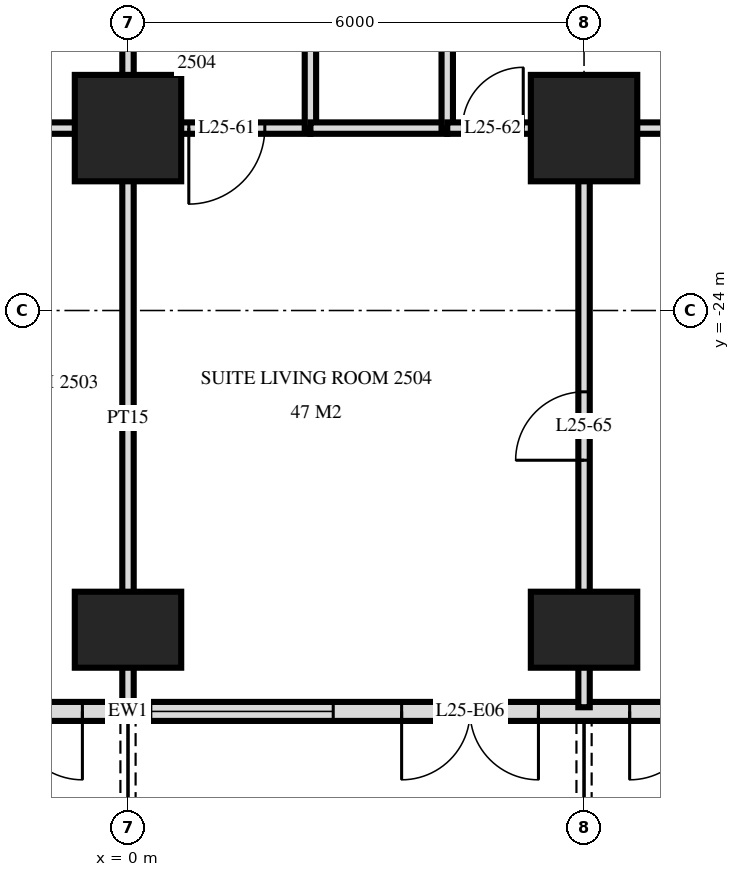
"""IFC4 building model, lengths in metres.
Left out: names, types, materials, properties, quantities, classifications, styles, units other than length and angle.
Written with IfcOpenShell. Run it as: python <this file> out.ifc"""

import sys

from ifc_helpers import new_model, si_unit, direction, frame, frame_2d, origin, origin_2d, place, context, subcontext, project, spatial, rectangle, extrude, element, fill, save


model = new_model("IFC4")
c1 = context("Model", 3, precision=1e-05, world=origin(), true_north=direction((0.0, 1.0)))
c2 = subcontext(c1, "Body", "Model", "MODEL_VIEW")
j1 = project(units=[si_unit("LENGTHUNIT", "METRE"), si_unit("PLANEANGLEUNIT", "RADIAN")], contexts=[c1])
p1 = place(None, origin())
s1 = spatial("IfcSite", under=j1, at=p1, CompositionType="ELEMENT")
p2 = place(p1, origin())
s2 = spatial("IfcBuilding", under=s1, at=p2, CompositionType="ELEMENT")
p3 = place(p2, frame((0.0, 0.0, 99.6)))
s3 = spatial("IfcBuildingStorey", under=s2, at=p3, CompositionType="ELEMENT", Elevation=99.6)
p4 = place(p3, frame((0.0, -28.2, 0.0), z_axis=(0.0, 0.0, 1.0), x_axis=(1.0, 0.0, 0.0)))
e1 = element("IfcColumn", 1, at=p4, inside=s3, PredefinedType="COLUMN", context=c2, shape_type="SweptSolid", body=[
    extrude(rectangle(XDim=1.4, YDim=1.0, at=origin_2d()), origin(), (0.0, 0.0, 1.0), 3.6),
])
p5 = place(p3, frame((0.0, -21.6, 0.0), z_axis=(0.0, 0.0, 1.0), x_axis=(1.0, 0.0, 0.0)))
e2 = element("IfcColumn", 2, at=p5, inside=s3, PredefinedType="COLUMN", context=c2, shape_type="SweptSolid", body=[
    extrude(rectangle(XDim=1.4, YDim=1.4, at=origin_2d()), origin(), (0.0, 0.0, 1.0), 3.6),
])
p6 = place(p3, frame((6.0, -28.2, 0.0), z_axis=(0.0, 0.0, 1.0), x_axis=(1.0, 0.0, 0.0)))
e3 = element("IfcColumn", 3, at=p6, inside=s3, PredefinedType="COLUMN", context=c2, shape_type="SweptSolid", body=[
    extrude(rectangle(XDim=1.4, YDim=1.0, at=origin_2d()), origin(), (0.0, 0.0, 1.0), 3.6),
])
p7 = place(p3, frame((6.0, -21.6, 0.0), z_axis=(0.0, 0.0, 1.0), x_axis=(1.0, 0.0, 0.0)))
e4 = element("IfcColumn", 4, at=p7, inside=s3, PredefinedType="COLUMN", context=c2, shape_type="SweptSolid", body=[
    extrude(rectangle(XDim=1.4, YDim=1.4, at=origin_2d()), origin(), (0.0, 0.0, 1.0), 3.6),
])
p8 = place(p3, frame((-28.775, -29.275, 0.0), z_axis=(0.0, 0.0, 1.0), x_axis=(1.0, 0.0, 0.0)))
e5 = element("IfcWall", 5, at=p8, inside=s3, PredefinedType="SOLIDWALL", context=c2, shape_type="SweptSolid", body=[
    extrude(rectangle(XDim=57.551, YDim=0.25, at=frame_2d((28.775, 0.0))), origin(), (0.0, 0.0, 1.0), 3.32),
])
p9 = place(p8, frame((0.575, 0.0, 0.0)))
e6 = element("IfcOpeningElement", 6, at=p9, cuts=e5, PredefinedType="OPENING", context=c2, shape_type="SweptSolid", body=[
    extrude(rectangle(XDim=1.8, YDim=2.4, at=frame_2d((0.9, 1.2))), frame((0.0, 0.135, 0.0), z_axis=(0.0, -1.0, 0.0), x_axis=(1.0, 0.0, 0.0)), (0.0, 0.0, 1.0), 0.27),
])
p10 = place(p8, frame((5.375, 0.0, 0.0)))
e7 = element("IfcOpeningElement", 7, at=p10, cuts=e5, PredefinedType="OPENING", context=c2, shape_type="SweptSolid", body=[
    extrude(rectangle(XDim=1.8, YDim=2.4, at=frame_2d((0.9, 1.2))), frame((0.0, 0.135, 0.0), z_axis=(0.0, -1.0, 0.0), x_axis=(1.0, 0.0, 0.0)), (0.0, 0.0, 1.0), 0.27),
])
p11 = place(p8, frame((8.075, 0.0, 0.3)))
e8 = element("IfcOpeningElement", 8, at=p11, cuts=e5, PredefinedType="OPENING", context=c2, shape_type="SweptSolid", body=[
    extrude(rectangle(XDim=2.4, YDim=2.1, at=frame_2d((1.2, 1.05))), frame((0.0, 0.135, 0.0), z_axis=(0.0, -1.0, 0.0), x_axis=(1.0, 0.0, 0.0)), (0.0, 0.0, 1.0), 0.27),
])
p12 = place(p8, frame((11.375, 0.0, 0.0)))
e9 = element("IfcOpeningElement", 9, at=p12, cuts=e5, PredefinedType="OPENING", context=c2, shape_type="SweptSolid", body=[
    extrude(rectangle(XDim=1.8, YDim=2.4, at=frame_2d((0.9, 1.2))), frame((0.0, 0.135, 0.0), z_axis=(0.0, -1.0, 0.0), x_axis=(1.0, 0.0, 0.0)), (0.0, 0.0, 1.0), 0.27),
])
p13 = place(p8, frame((14.075, 0.0, 0.3)))
e10 = element("IfcOpeningElement", 10, at=p13, cuts=e5, PredefinedType="OPENING", context=c2, shape_type="SweptSolid", body=[
    extrude(rectangle(XDim=2.4, YDim=2.1, at=frame_2d((1.2, 1.05))), frame((0.0, 0.135, 0.0), z_axis=(0.0, -1.0, 0.0), x_axis=(1.0, 0.0, 0.0)), (0.0, 0.0, 1.0), 0.27),
])
p14 = place(p8, frame((17.375, 0.0, 0.0)))
e11 = element("IfcOpeningElement", 11, at=p14, cuts=e5, PredefinedType="OPENING", context=c2, shape_type="SweptSolid", body=[
    extrude(rectangle(XDim=1.8, YDim=2.4, at=frame_2d((0.9, 1.2))), frame((0.0, 0.135, 0.0), z_axis=(0.0, -1.0, 0.0), x_axis=(1.0, 0.0, 0.0)), (0.0, 0.0, 1.0), 0.27),
])
p15 = place(p8, frame((20.075, 0.0, 0.3)))
e12 = element("IfcOpeningElement", 12, at=p15, cuts=e5, PredefinedType="OPENING", context=c2, shape_type="SweptSolid", body=[
    extrude(rectangle(XDim=2.4, YDim=2.1, at=frame_2d((1.2, 1.05))), frame((0.0, 0.135, 0.0), z_axis=(0.0, -1.0, 0.0), x_axis=(1.0, 0.0, 0.0)), (0.0, 0.0, 1.0), 0.27),
])
p16 = place(p8, frame((23.075, 0.0, 0.3)))
e13 = element("IfcOpeningElement", 13, at=p16, cuts=e5, PredefinedType="OPENING", context=c2, shape_type="SweptSolid", body=[
    extrude(rectangle(XDim=2.4, YDim=2.1, at=frame_2d((1.2, 1.05))), frame((0.0, 0.135, 0.0), z_axis=(0.0, -1.0, 0.0), x_axis=(1.0, 0.0, 0.0)), (0.0, 0.0, 1.0), 0.27),
])
p17 = place(p8, frame((26.375, 0.0, 0.0)))
e14 = element("IfcOpeningElement", 14, at=p17, cuts=e5, PredefinedType="OPENING", context=c2, shape_type="SweptSolid", body=[
    extrude(rectangle(XDim=1.8, YDim=2.4, at=frame_2d((0.9, 1.2))), frame((0.0, 0.135, 0.0), z_axis=(0.0, -1.0, 0.0), x_axis=(1.0, 0.0, 0.0)), (0.0, 0.0, 1.0), 0.27),
])
p18 = place(p8, frame((29.075, 0.0, 0.3)))
e15 = element("IfcOpeningElement", 15, at=p18, cuts=e5, PredefinedType="OPENING", context=c2, shape_type="SweptSolid", body=[
    extrude(rectangle(XDim=2.4, YDim=2.1, at=frame_2d((1.2, 1.05))), frame((0.0, 0.135, 0.0), z_axis=(0.0, -1.0, 0.0), x_axis=(1.0, 0.0, 0.0)), (0.0, 0.0, 1.0), 0.27),
])
p19 = place(p8, frame((32.375, 0.0, 0.0)))
e16 = element("IfcOpeningElement", 16, at=p19, cuts=e5, PredefinedType="OPENING", context=c2, shape_type="SweptSolid", body=[
    extrude(rectangle(XDim=1.8, YDim=2.4, at=frame_2d((0.9, 1.2))), frame((0.0, 0.135, 0.0), z_axis=(0.0, -1.0, 0.0), x_axis=(1.0, 0.0, 0.0)), (0.0, 0.0, 1.0), 0.27),
])
p20 = place(p8, frame((35.375, 0.0, 0.0)))
e17 = element("IfcOpeningElement", 17, at=p20, cuts=e5, PredefinedType="OPENING", context=c2, shape_type="SweptSolid", body=[
    extrude(rectangle(XDim=1.8, YDim=2.4, at=frame_2d((0.9, 1.2))), frame((0.0, 0.135, 0.0), z_axis=(0.0, -1.0, 0.0), x_axis=(1.0, 0.0, 0.0)), (0.0, 0.0, 1.0), 0.27),
])
p21 = place(p8, frame((38.075, 0.0, 0.3)))
e18 = element("IfcOpeningElement", 18, at=p21, cuts=e5, PredefinedType="OPENING", context=c2, shape_type="SweptSolid", body=[
    extrude(rectangle(XDim=2.4, YDim=2.1, at=frame_2d((1.2, 1.05))), frame((0.0, 0.135, 0.0), z_axis=(0.0, -1.0, 0.0), x_axis=(1.0, 0.0, 0.0)), (0.0, 0.0, 1.0), 0.27),
])
p22 = place(p8, frame((41.375, 0.0, 0.0)))
e19 = element("IfcOpeningElement", 19, at=p22, cuts=e5, PredefinedType="OPENING", context=c2, shape_type="SweptSolid", body=[
    extrude(rectangle(XDim=1.8, YDim=2.4, at=frame_2d((0.9, 1.2))), frame((0.0, 0.135, 0.0), z_axis=(0.0, -1.0, 0.0), x_axis=(1.0, 0.0, 0.0)), (0.0, 0.0, 1.0), 0.27),
])
p23 = place(p8, frame((44.075, 0.0, 0.3)))
e20 = element("IfcOpeningElement", 20, at=p23, cuts=e5, PredefinedType="OPENING", context=c2, shape_type="SweptSolid", body=[
    extrude(rectangle(XDim=2.4, YDim=2.1, at=frame_2d((1.2, 1.05))), frame((0.0, 0.135, 0.0), z_axis=(0.0, -1.0, 0.0), x_axis=(1.0, 0.0, 0.0)), (0.0, 0.0, 1.0), 0.27),
])
p24 = place(p8, frame((47.075, 0.0, 0.3)))
e21 = element("IfcOpeningElement", 21, at=p24, cuts=e5, PredefinedType="OPENING", context=c2, shape_type="SweptSolid", body=[
    extrude(rectangle(XDim=2.4, YDim=2.1, at=frame_2d((1.2, 1.05))), frame((0.0, 0.135, 0.0), z_axis=(0.0, -1.0, 0.0), x_axis=(1.0, 0.0, 0.0)), (0.0, 0.0, 1.0), 0.27),
])
p25 = place(p8, frame((50.375, 0.0, 0.0)))
e22 = element("IfcOpeningElement", 22, at=p25, cuts=e5, PredefinedType="OPENING", context=c2, shape_type="SweptSolid", body=[
    extrude(rectangle(XDim=1.8, YDim=2.4, at=frame_2d((0.9, 1.2))), frame((0.0, 0.135, 0.0), z_axis=(0.0, -1.0, 0.0), x_axis=(1.0, 0.0, 0.0)), (0.0, 0.0, 1.0), 0.27),
])
p26 = place(p8, frame((53.375, 0.0, 0.0)))
e23 = element("IfcOpeningElement", 23, at=p26, cuts=e5, PredefinedType="OPENING", context=c2, shape_type="SweptSolid", body=[
    extrude(rectangle(XDim=1.8, YDim=2.4, at=frame_2d((0.9, 1.2))), frame((0.0, 0.135, 0.0), z_axis=(0.0, -1.0, 0.0), x_axis=(1.0, 0.0, 0.0)), (0.0, 0.0, 1.0), 0.27),
])
p27 = place(p3, frame((6.0, -29.22, 0.0), z_axis=(0.0, 0.0, 1.0), x_axis=(0.0, 1.0, 0.0)))
e24 = element("IfcWall", 24, at=p27, inside=s3, PredefinedType="PARTITIONING", context=c2, shape_type="SweptSolid", body=[
    extrude(rectangle(XDim=7.62, YDim=0.15, at=frame_2d((3.81, 0.0))), origin(), (0.0, 0.0, 1.0), 3.32),
])
p28 = place(p27, frame((3.25, 0.0, 0.0)))
e25 = element("IfcOpeningElement", 25, at=p28, cuts=e24, PredefinedType="OPENING", context=c2, shape_type="SweptSolid", body=[
    extrude(rectangle(XDim=0.9, YDim=2.1, at=frame_2d((0.45, 1.05))), frame((0.0, 0.085, 0.0), z_axis=(0.0, -1.0, 0.0), x_axis=(1.0, 0.0, 0.0)), (0.0, 0.0, 1.0), 0.17),
])
p29 = place(p3, frame((4.2, -21.6, 0.0), z_axis=(0.0, 0.0, 1.0), x_axis=(0.0, 1.0, 0.0)))
e26 = element("IfcWall", 26, at=p29, inside=s3, PredefinedType="PLUMBINGWALL", context=c2, shape_type="SweptSolid", body=[
    extrude(rectangle(XDim=3.6, YDim=0.15, at=frame_2d((1.8, 0.0))), origin(), (0.0, 0.0, 1.0), 3.32),
])
p30 = place(p3, frame((2.4, -21.6, 0.0), z_axis=(0.0, 0.0, 1.0), x_axis=(0.0, 1.0, 0.0)))
e27 = element("IfcWall", 27, at=p30, inside=s3, PredefinedType="PARTITIONING", context=c2, shape_type="SweptSolid", body=[
    extrude(rectangle(XDim=3.6, YDim=0.15, at=frame_2d((1.8, 0.0))), origin(), (0.0, 0.0, 1.0), 3.32),
])
p31 = place(p30, frame((1.3, 0.0, 0.0)))
e28 = element("IfcOpeningElement", 28, at=p31, cuts=e27, PredefinedType="OPENING", context=c2, shape_type="SweptSolid", body=[
    extrude(rectangle(XDim=1.0, YDim=2.1, at=frame_2d((0.5, 1.05))), frame((0.0, 0.085, 0.0), z_axis=(0.0, -1.0, 0.0), x_axis=(1.0, 0.0, 0.0)), (0.0, 0.0, 1.0), 0.17),
])
p32 = place(p3, frame((0.0, -21.6, 0.0), z_axis=(0.0, 0.0, 1.0), x_axis=(0.0, 1.0, 0.0)))
e29 = element("IfcWall", 29, at=p32, inside=s3, PredefinedType="PARTITIONING", context=c2, shape_type="SweptSolid", body=[
    extrude(rectangle(XDim=3.6, YDim=0.15, at=frame_2d((1.8, 0.0))), origin(), (0.0, 0.0, 1.0), 3.32),
])
p33 = place(p3, frame((0.0, -29.22, 0.0), z_axis=(0.0, 0.0, 1.0), x_axis=(0.0, 1.0, 0.0)))
e30 = element("IfcWall", 30, at=p33, inside=s3, PredefinedType="PARTITIONING", context=c2, shape_type="SweptSolid", body=[
    extrude(rectangle(XDim=7.62, YDim=0.15, at=frame_2d((3.81, 0.0))), origin(), (0.0, 0.0, 1.0), 3.32),
])
p34 = place(p3, frame((0.0, -21.6, 0.0), z_axis=(0.0, 0.0, 1.0), x_axis=(1.0, 0.0, 0.0)))
e31 = element("IfcWall", 31, at=p34, inside=s3, PredefinedType="PARTITIONING", context=c2, shape_type="SweptSolid", body=[
    extrude(rectangle(XDim=2.4, YDim=0.15, at=frame_2d((1.2, 0.0))), origin(), (0.0, 0.0, 1.0), 3.32),
])
p35 = place(p34, frame((0.8, 0.0, 0.0)))
e32 = element("IfcOpeningElement", 32, at=p35, cuts=e31, PredefinedType="OPENING", context=c2, shape_type="SweptSolid", body=[
    extrude(rectangle(XDim=1.0, YDim=2.1, at=frame_2d((0.5, 1.05))), frame((0.0, 0.085, 0.0), z_axis=(0.0, -1.0, 0.0), x_axis=(1.0, 0.0, 0.0)), (0.0, 0.0, 1.0), 0.17),
])
p36 = place(p3, frame((-1.7, -21.6, 0.0), z_axis=(0.0, 0.0, 1.0), x_axis=(1.0, 0.0, 0.0)))
e33 = element("IfcWall", 33, at=p36, inside=s3, PredefinedType="PARTITIONING", context=c2, shape_type="SweptSolid", body=[
    extrude(rectangle(XDim=1.7, YDim=0.15, at=frame_2d((0.85, 0.0))), origin(), (0.0, 0.0, 1.0), 3.32),
])
p37 = place(p3, frame((4.2, -21.6, 0.0), z_axis=(0.0, 0.0, 1.0), x_axis=(1.0, 0.0, 0.0)))
e34 = element("IfcWall", 34, at=p37, inside=s3, PredefinedType="PARTITIONING", context=c2, shape_type="SweptSolid", body=[
    extrude(rectangle(XDim=7.8, YDim=0.15, at=frame_2d((3.9, 0.0))), origin(), (0.0, 0.0, 1.0), 3.32),
])
p38 = place(p37, frame((0.2, 0.0, 0.0)))
e35 = element("IfcOpeningElement", 35, at=p38, cuts=e34, PredefinedType="OPENING", context=c2, shape_type="SweptSolid", body=[
    extrude(rectangle(XDim=0.8, YDim=2.1, at=frame_2d((0.4, 1.05))), frame((0.0, 0.085, 0.0), z_axis=(0.0, -1.0, 0.0), x_axis=(1.0, 0.0, 0.0)), (0.0, 0.0, 1.0), 0.17),
])
p39 = place(p37, frame((4.03, 0.0, 0.0)))
e36 = element("IfcOpeningElement", 36, at=p39, cuts=e34, PredefinedType="OPENING", context=c2, shape_type="SweptSolid", body=[
    extrude(rectangle(XDim=0.9, YDim=2.1, at=frame_2d((0.45, 1.05))), frame((0.0, 0.085, 0.0), z_axis=(0.0, -1.0, 0.0), x_axis=(1.0, 0.0, 0.0)), (0.0, 0.0, 1.0), 0.17),
])
p40 = place(p37, frame((6.1, 0.0, 0.0)))
e37 = element("IfcOpeningElement", 37, at=p40, cuts=e34, PredefinedType="OPENING", context=c2, shape_type="SweptSolid", body=[
    extrude(rectangle(XDim=0.9, YDim=2.1, at=frame_2d((0.45, 1.05))), frame((0.0, 0.085, 0.0), z_axis=(0.0, -1.0, 0.0), x_axis=(1.0, 0.0, 0.0)), (0.0, 0.0, 1.0), 0.17),
])
p41 = place(p3, frame((2.4, -21.6, 0.0), z_axis=(0.0, 0.0, 1.0), x_axis=(1.0, 0.0, 0.0)))
e38 = element("IfcWall", 38, at=p41, inside=s3, PredefinedType="PLUMBINGWALL", context=c2, shape_type="SweptSolid", body=[
    extrude(rectangle(XDim=1.8, YDim=0.15, at=frame_2d((0.9, 0.0))), origin(), (0.0, 0.0, 1.0), 3.32),
])
p42 = place(p17, frame((0.9, 0.0, 0.0), z_axis=(0.0, 0.0, 1.0), x_axis=(-1.0, 0.0, 0.0)))
e39 = element("IfcDoor", 39, at=p42, inside=s3, OperationType="DOUBLE_DOOR_SINGLE_SWING", PredefinedType="DOOR", context=c2, shape_type="SweptSolid", body=[
    extrude(rectangle(XDim=1.8, YDim=2.4, at=frame_2d((0.0, 1.2))), frame((0.0, -0.025, 0.0), z_axis=(0.0, 1.0, 0.0), x_axis=(-1.0, 0.0, 0.0)), (0.0, 0.0, 1.0), 0.05),
])
fill(e14, e39)
p43 = place(p18, origin())
e40 = element("IfcWindow", 40, at=p43, inside=s3, PartitioningType="SINGLE_PANEL", PredefinedType="WINDOW", context=c2, shape_type="SweptSolid", body=[
    extrude(rectangle(XDim=2.4, YDim=2.1, at=frame_2d((1.2, 1.05))), frame((0.0, 0.03, 0.0), z_axis=(0.0, -1.0, 0.0), x_axis=(1.0, 0.0, 0.0)), (0.0, 0.0, 1.0), 0.06),
])
fill(e15, e40)
p44 = place(p19, frame((0.9, 0.0, 0.0), z_axis=(0.0, 0.0, 1.0), x_axis=(-1.0, 0.0, 0.0)))
e41 = element("IfcDoor", 41, at=p44, inside=s3, OperationType="DOUBLE_DOOR_SINGLE_SWING", PredefinedType="DOOR", context=c2, shape_type="SweptSolid", body=[
    extrude(rectangle(XDim=1.8, YDim=2.4, at=frame_2d((0.0, 1.2))), frame((0.0, -0.025, 0.0), z_axis=(0.0, 1.0, 0.0), x_axis=(-1.0, 0.0, 0.0)), (0.0, 0.0, 1.0), 0.05),
])
fill(e16, e41)
p45 = place(p20, frame((0.9, 0.0, 0.0), z_axis=(0.0, 0.0, 1.0), x_axis=(-1.0, 0.0, 0.0)))
e42 = element("IfcDoor", 42, at=p45, inside=s3, OperationType="DOUBLE_DOOR_SINGLE_SWING", PredefinedType="DOOR", context=c2, shape_type="SweptSolid", body=[
    extrude(rectangle(XDim=1.8, YDim=2.4, at=frame_2d((0.0, 1.2))), frame((0.0, -0.025, 0.0), z_axis=(0.0, 1.0, 0.0), x_axis=(-1.0, 0.0, 0.0)), (0.0, 0.0, 1.0), 0.05),
])
fill(e17, e42)
p46 = place(p35, frame((0.5, 0.0, 0.0), z_axis=(0.0, 0.0, 1.0), x_axis=(-1.0, 0.0, 0.0)))
e43 = element("IfcDoor", 43, at=p46, inside=s3, OperationType="SINGLE_SWING_LEFT", PredefinedType="DOOR", context=c2, shape_type="SweptSolid", body=[
    extrude(rectangle(XDim=1.0, YDim=2.1, at=frame_2d((0.0, 1.05))), frame((0.0, -0.025, 0.0), z_axis=(0.0, 1.0, 0.0), x_axis=(-1.0, 0.0, 0.0)), (0.0, 0.0, 1.0), 0.05),
])
fill(e32, e43)
p47 = place(p38, origin())
e44 = element("IfcDoor", 44, at=p47, inside=s3, OperationType="SINGLE_SWING_LEFT", PredefinedType="DOOR", context=c2, shape_type="SweptSolid", body=[
    extrude(rectangle(XDim=0.8, YDim=2.1, at=frame_2d((0.4, 1.05))), frame((0.0, 0.025, 0.0), z_axis=(0.0, -1.0, 0.0), x_axis=(1.0, 0.0, 0.0)), (0.0, 0.0, 1.0), 0.05),
])
fill(e35, e44)
p48 = place(p28, origin())
e45 = element("IfcDoor", 45, at=p48, inside=s3, OperationType="SINGLE_SWING_RIGHT", PredefinedType="DOOR", context=c2, shape_type="SweptSolid", body=[
    extrude(rectangle(XDim=0.9, YDim=2.1, at=frame_2d((0.45, 1.05))), frame((0.0, 0.025, 0.0), z_axis=(0.0, -1.0, 0.0), x_axis=(1.0, 0.0, 0.0)), (0.0, 0.0, 1.0), 0.05),
])
fill(e25, e45)
save(model, sys.argv[1])
